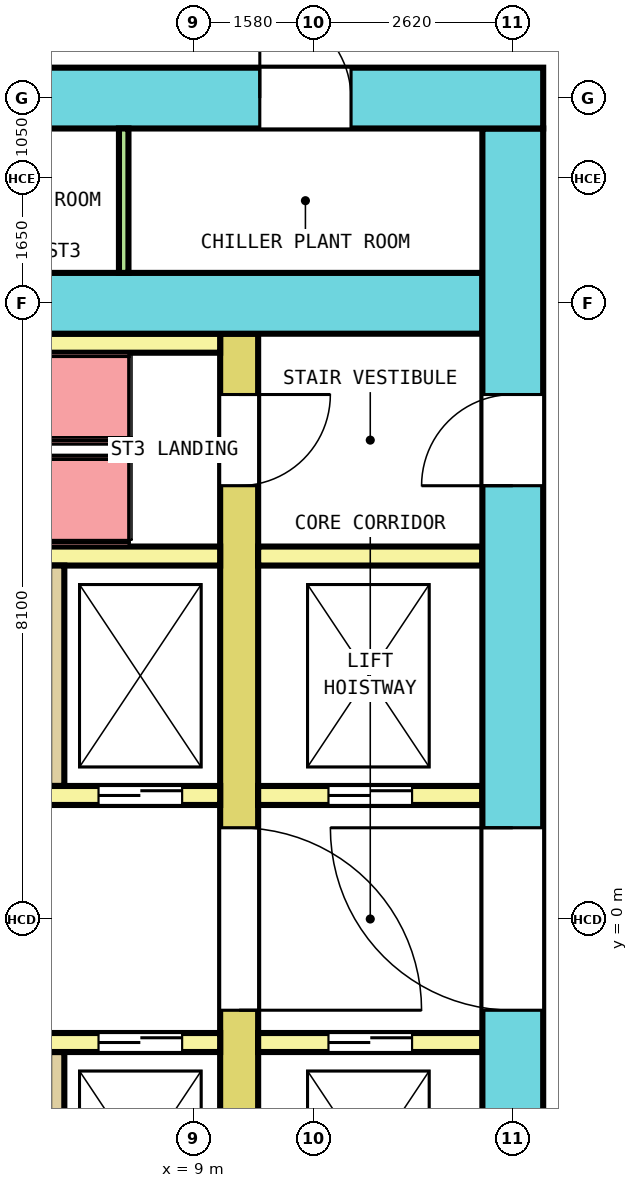
"""IFC4 building model, lengths in metres.
Left out: names, types, materials, properties, quantities, classifications, styles, units other than length and angle.
Written with IfcOpenShell. Run it as: python <this file> out.ifc"""

import sys

from ifc_helpers import new_model, si_unit, direction, frame, frame_2d, origin, place, context, subcontext, project, spatial, rectangle, extrude, element, fill, save


model = new_model("IFC4")
c1 = context("Model", 3, precision=1e-05, world=origin(), true_north=direction((0.0, 1.0)))
c2 = subcontext(c1, "Body", "Model", "MODEL_VIEW")
j1 = project(units=[si_unit("LENGTHUNIT", "METRE"), si_unit("PLANEANGLEUNIT", "RADIAN")], contexts=[c1])
p1 = place(None, origin())
s1 = spatial("IfcSite", under=j1, at=p1, CompositionType="ELEMENT")
p2 = place(p1, origin())
s2 = spatial("IfcBuilding", under=s1, at=p2, CompositionType="ELEMENT")
p3 = place(p2, frame((0.0, 0.0, 71.8)))
s3 = spatial("IfcBuildingStorey", under=s2, at=p3, CompositionType="ELEMENT", Elevation=71.8)
p4 = place(p3, frame((-13.6, 10.8, 0.0), z_axis=(0.0, 0.0, 1.0), x_axis=(1.0, 0.0, 0.0)))
e1 = element("IfcWall", 1, at=p4, inside=s3, PredefinedType="SHEAR", context=c2, shape_type="SweptSolid", body=[
    extrude(rectangle(XDim=27.2, YDim=0.8, at=frame_2d((13.6, 0.0))), origin(), (0.0, 0.0, 1.0), 8.7),
])
p5 = place(p4, frame((3.228, 0.0, 0.0)))
e2 = element("IfcOpeningElement", 2, at=p5, cuts=e1, PredefinedType="OPENING", context=c2, shape_type="SweptSolid", body=[
    extrude(rectangle(XDim=1.2, YDim=2.1, at=frame_2d((0.6, 1.05))), frame((0.0, 0.41, 0.0), z_axis=(0.0, -1.0, 0.0), x_axis=(1.0, 0.0, 0.0)), (0.0, 0.0, 1.0), 0.82),
])
p6 = place(p4, frame((9.378, 0.0, 0.0)))
e3 = element("IfcOpeningElement", 3, at=p6, cuts=e1, PredefinedType="OPENING", context=c2, shape_type="SweptSolid", body=[
    extrude(rectangle(XDim=1.2, YDim=2.1, at=frame_2d((0.6, 1.05))), frame((0.0, 0.41, 0.0), z_axis=(0.0, -1.0, 0.0), x_axis=(1.0, 0.0, 0.0)), (0.0, 0.0, 1.0), 0.82),
])
p7 = place(p4, frame((18.722, 0.0, 0.0)))
e4 = element("IfcOpeningElement", 4, at=p7, cuts=e1, PredefinedType="OPENING", context=c2, shape_type="SweptSolid", body=[
    extrude(rectangle(XDim=1.2, YDim=2.1, at=frame_2d((0.6, 1.05))), frame((0.0, 0.41, 0.0), z_axis=(0.0, -1.0, 0.0), x_axis=(1.0, 0.0, 0.0)), (0.0, 0.0, 1.0), 0.82),
])
p8 = place(p4, frame((23.472, 0.0, 0.0)))
e5 = element("IfcOpeningElement", 5, at=p8, cuts=e1, PredefinedType="OPENING", context=c2, shape_type="SweptSolid", body=[
    extrude(rectangle(XDim=1.2, YDim=2.1, at=frame_2d((0.6, 1.05))), frame((0.0, 0.41, 0.0), z_axis=(0.0, -1.0, 0.0), x_axis=(1.0, 0.0, 0.0)), (0.0, 0.0, 1.0), 0.82),
])
p9 = place(p4, frame((14.525, 0.0, 0.0)))
e6 = element("IfcOpeningElement", 6, at=p9, cuts=e1, PredefinedType="OPENING", context=c2, shape_type="SweptSolid", body=[
    extrude(rectangle(XDim=1.4, YDim=2.1, at=frame_2d((0.7, 1.05))), frame((0.0, 0.41, 0.0), z_axis=(0.0, -1.0, 0.0), x_axis=(1.0, 0.0, 0.0)), (0.0, 0.0, 1.0), 0.82),
])
p10 = place(p3, frame((13.2, -10.4, 0.0), z_axis=(0.0, 0.0, 1.0), x_axis=(0.0, 1.0, 0.0)))
e7 = element("IfcWall", 7, at=p10, inside=s3, PredefinedType="SHEAR", context=c2, shape_type="SweptSolid", body=[
    extrude(rectangle(XDim=20.8, YDim=0.8, at=frame_2d((10.4, 0.0))), origin(), (0.0, 0.0, 1.0), 8.7),
])
p11 = place(p10, frame((9.2, 0.0, 0.0)))
e8 = element("IfcOpeningElement", 8, at=p11, cuts=e7, PredefinedType="OPENING", context=c2, shape_type="SweptSolid", body=[
    extrude(rectangle(XDim=2.4, YDim=2.1, at=frame_2d((1.2, 1.05))), frame((0.0, 0.41, 0.0), z_axis=(0.0, -1.0, 0.0), x_axis=(1.0, 0.0, 0.0)), (0.0, 0.0, 1.0), 0.82),
])
p12 = place(p10, frame((16.1, 0.0, 0.0)))
e9 = element("IfcOpeningElement", 9, at=p12, cuts=e7, PredefinedType="OPENING", context=c2, shape_type="SweptSolid", body=[
    extrude(rectangle(XDim=1.2, YDim=2.1, at=frame_2d((0.6, 1.05))), frame((0.0, 0.41, 0.0), z_axis=(0.0, -1.0, 0.0), x_axis=(1.0, 0.0, 0.0)), (0.0, 0.0, 1.0), 0.82),
])
p13 = place(p10, frame((3.6, 0.0, 0.0)))
e10 = element("IfcOpeningElement", 10, at=p13, cuts=e7, PredefinedType="OPENING", context=c2, shape_type="SweptSolid", body=[
    extrude(rectangle(XDim=1.0, YDim=2.1, at=frame_2d((0.5, 1.05))), frame((0.0, 0.41, 0.0), z_axis=(0.0, -1.0, 0.0), x_axis=(1.0, 0.0, 0.0)), (0.0, 0.0, 1.0), 0.82),
])
p14 = place(p3, frame((-12.8, 8.1, 0.0), z_axis=(0.0, 0.0, 1.0), x_axis=(1.0, 0.0, 0.0)))
e11 = element("IfcWall", 11, at=p14, inside=s3, PredefinedType="SHEAR", context=c2, shape_type="SweptSolid", body=[
    extrude(rectangle(XDim=25.6, YDim=0.8, at=frame_2d((12.8, 0.0))), origin(), (0.0, 0.0, 1.0), 8.7),
])
p15 = place(p14, frame((13.725, 0.0, 0.0)))
e12 = element("IfcOpeningElement", 12, at=p15, cuts=e11, PredefinedType="OPENING", context=c2, shape_type="SweptSolid", body=[
    extrude(rectangle(XDim=1.4, YDim=2.1, at=frame_2d((0.7, 1.05))), frame((0.0, 0.41, 0.0), z_axis=(0.0, -1.0, 0.0), x_axis=(1.0, 0.0, 0.0)), (0.0, 0.0, 1.0), 0.82),
])
p16 = place(p3, frame((9.6, -7.7, 0.0), z_axis=(0.0, 0.0, 1.0), x_axis=(0.0, 1.0, 0.0)))
e13 = element("IfcWall", 13, at=p16, inside=s3, PredefinedType="SHEAR", context=c2, shape_type="SweptSolid", body=[
    extrude(rectangle(XDim=15.4, YDim=0.5, at=frame_2d((7.7, 0.0))), origin(), (0.0, 0.0, 1.0), 8.7),
])
p17 = place(p16, frame((6.5, 0.0, 0.0)))
e14 = element("IfcOpeningElement", 14, at=p17, cuts=e13, PredefinedType="OPENING", context=c2, shape_type="SweptSolid", body=[
    extrude(rectangle(XDim=2.4, YDim=2.1, at=frame_2d((1.2, 1.05))), frame((0.0, 0.26, 0.0), z_axis=(0.0, -1.0, 0.0), x_axis=(1.0, 0.0, 0.0)), (0.0, 0.0, 1.0), 0.52),
])
p18 = place(p16, frame((13.4, 0.0, 0.0)))
e15 = element("IfcOpeningElement", 15, at=p18, cuts=e13, PredefinedType="OPENING", context=c2, shape_type="SweptSolid", body=[
    extrude(rectangle(XDim=1.2, YDim=2.1, at=frame_2d((0.6, 1.05))), frame((0.0, 0.26, 0.0), z_axis=(0.0, -1.0, 0.0), x_axis=(1.0, 0.0, 0.0)), (0.0, 0.0, 1.0), 0.52),
])
p19 = place(p16, frame((0.9, 0.0, 0.0)))
e16 = element("IfcOpeningElement", 16, at=p19, cuts=e13, PredefinedType="OPENING", context=c2, shape_type="SweptSolid", body=[
    extrude(rectangle(XDim=1.0, YDim=2.1, at=frame_2d((0.5, 1.05))), frame((0.0, 0.26, 0.0), z_axis=(0.0, -1.0, 0.0), x_axis=(1.0, 0.0, 0.0)), (0.0, 0.0, 1.0), 0.52),
])
p20 = place(p3, frame((-9.35, 1.625, 0.0), z_axis=(0.0, 0.0, 1.0), x_axis=(1.0, 0.0, 0.0)))
e17 = element("IfcWall", 17, at=p20, inside=s3, PredefinedType="SOLIDWALL", context=c2, shape_type="SweptSolid", body=[
    extrude(rectangle(XDim=18.7, YDim=0.25, at=frame_2d((9.35, 0.0))), origin(), (0.0, 0.0, 1.0), 8.7),
])
p21 = place(p20, frame((0.5, 0.0, 0.0)))
e18 = element("IfcOpeningElement", 18, at=p21, cuts=e17, PredefinedType="OPENING", context=c2, shape_type="SweptSolid", body=[
    extrude(rectangle(XDim=1.1, YDim=2.1, at=frame_2d((0.55, 1.05))), frame((0.0, 0.135, 0.0), z_axis=(0.0, -1.0, 0.0), x_axis=(1.0, 0.0, 0.0)), (0.0, 0.0, 1.0), 0.27),
])
p22 = place(p20, frame((17.1, 0.0, 0.0)))
e19 = element("IfcOpeningElement", 19, at=p22, cuts=e17, PredefinedType="OPENING", context=c2, shape_type="SweptSolid", body=[
    extrude(rectangle(XDim=1.1, YDim=2.1, at=frame_2d((0.55, 1.05))), frame((0.0, 0.135, 0.0), z_axis=(0.0, -1.0, 0.0), x_axis=(1.0, 0.0, 0.0)), (0.0, 0.0, 1.0), 0.27),
])
p23 = place(p3, frame((9.85, 1.625, 0.0), z_axis=(0.0, 0.0, 1.0), x_axis=(1.0, 0.0, 0.0)))
e20 = element("IfcWall", 20, at=p23, inside=s3, PredefinedType="SOLIDWALL", context=c2, shape_type="SweptSolid", body=[
    extrude(rectangle(XDim=2.95, YDim=0.25, at=frame_2d((1.475, 0.0))), origin(), (0.0, 0.0, 1.0), 8.7),
])
p24 = place(p23, frame((0.925, 0.0, 0.0)))
e21 = element("IfcOpeningElement", 21, at=p24, cuts=e20, PredefinedType="OPENING", context=c2, shape_type="SweptSolid", body=[
    extrude(rectangle(XDim=1.1, YDim=2.1, at=frame_2d((0.55, 1.05))), frame((0.0, 0.135, 0.0), z_axis=(0.0, -1.0, 0.0), x_axis=(1.0, 0.0, 0.0)), (0.0, 0.0, 1.0), 0.27),
])
p25 = place(p3, frame((-9.35, 4.775, 0.0), z_axis=(0.0, 0.0, 1.0), x_axis=(1.0, 0.0, 0.0)))
e22 = element("IfcWall", 22, at=p25, inside=s3, PredefinedType="SOLIDWALL", context=c2, shape_type="SweptSolid", body=[
    extrude(rectangle(XDim=18.7, YDim=0.25, at=frame_2d((9.35, 0.0))), origin(), (0.0, 0.0, 1.0), 8.7),
])
p26 = place(p3, frame((9.85, 4.775, 0.0), z_axis=(0.0, 0.0, 1.0), x_axis=(1.0, 0.0, 0.0)))
e23 = element("IfcWall", 23, at=p26, inside=s3, PredefinedType="SOLIDWALL", context=c2, shape_type="SweptSolid", body=[
    extrude(rectangle(XDim=2.95, YDim=0.25, at=frame_2d((1.475, 0.0))), origin(), (0.0, 0.0, 1.0), 8.7),
])
p27 = place(p3, frame((7.2, 1.75, 0.0), z_axis=(0.0, 0.0, 1.0), x_axis=(0.0, 1.0, 0.0)))
e24 = element("IfcWall", 24, at=p27, inside=s3, PredefinedType="SOLIDWALL", context=c2, shape_type="SweptSolid", body=[
    extrude(rectangle(XDim=2.9, YDim=0.2, at=frame_2d((1.45, 0.0))), origin(), (0.0, 0.0, 1.0), 8.7),
])
p28 = place(p3, frame((-9.35, -1.625, 0.0), z_axis=(0.0, 0.0, 1.0), x_axis=(1.0, 0.0, 0.0)))
e25 = element("IfcWall", 25, at=p28, inside=s3, PredefinedType="SOLIDWALL", context=c2, shape_type="SweptSolid", body=[
    extrude(rectangle(XDim=18.7, YDim=0.25, at=frame_2d((9.35, 0.0))), origin(), (0.0, 0.0, 1.0), 8.7),
])
p29 = place(p28, frame((0.5, 0.0, 0.0)))
e26 = element("IfcOpeningElement", 26, at=p29, cuts=e25, PredefinedType="OPENING", context=c2, shape_type="SweptSolid", body=[
    extrude(rectangle(XDim=1.1, YDim=2.1, at=frame_2d((0.55, 1.05))), frame((0.0, 0.135, 0.0), z_axis=(0.0, -1.0, 0.0), x_axis=(1.0, 0.0, 0.0)), (0.0, 0.0, 1.0), 0.27),
])
p30 = place(p28, frame((17.1, 0.0, 0.0)))
e27 = element("IfcOpeningElement", 27, at=p30, cuts=e25, PredefinedType="OPENING", context=c2, shape_type="SweptSolid", body=[
    extrude(rectangle(XDim=1.1, YDim=2.1, at=frame_2d((0.55, 1.05))), frame((0.0, 0.135, 0.0), z_axis=(0.0, -1.0, 0.0), x_axis=(1.0, 0.0, 0.0)), (0.0, 0.0, 1.0), 0.27),
])
p31 = place(p3, frame((9.85, -1.625, 0.0), z_axis=(0.0, 0.0, 1.0), x_axis=(1.0, 0.0, 0.0)))
e28 = element("IfcWall", 28, at=p31, inside=s3, PredefinedType="SOLIDWALL", context=c2, shape_type="SweptSolid", body=[
    extrude(rectangle(XDim=2.95, YDim=0.25, at=frame_2d((1.475, 0.0))), origin(), (0.0, 0.0, 1.0), 8.7),
])
p32 = place(p31, frame((0.925, 0.0, 0.0)))
e29 = element("IfcOpeningElement", 29, at=p32, cuts=e28, PredefinedType="OPENING", context=c2, shape_type="SweptSolid", body=[
    extrude(rectangle(XDim=1.1, YDim=2.1, at=frame_2d((0.55, 1.05))), frame((0.0, 0.135, 0.0), z_axis=(0.0, -1.0, 0.0), x_axis=(1.0, 0.0, 0.0)), (0.0, 0.0, 1.0), 0.27),
])
p33 = place(p3, frame((7.2, -4.65, 0.0), z_axis=(0.0, 0.0, 1.0), x_axis=(0.0, 1.0, 0.0)))
e30 = element("IfcWall", 30, at=p33, inside=s3, PredefinedType="SOLIDWALL", context=c2, shape_type="SweptSolid", body=[
    extrude(rectangle(XDim=2.9, YDim=0.2, at=frame_2d((1.45, 0.0))), origin(), (0.0, 0.0, 1.0), 8.7),
])
p34 = place(p3, frame((3.55, 7.575, 0.0), z_axis=(0.0, 0.0, 1.0), x_axis=(1.0, 0.0, 0.0)))
e31 = element("IfcWall", 31, at=p34, inside=s3, PredefinedType="SOLIDWALL", context=c2, shape_type="SweptSolid", body=[
    extrude(rectangle(XDim=5.8, YDim=0.25, at=frame_2d((2.9, 0.0))), origin(), (0.0, 0.0, 1.0), 8.7),
])
p35 = place(p3, frame((8.081, 8.5, 0.0), z_axis=(0.0, 0.0, 1.0), x_axis=(0.0, 1.0, 0.0)))
e32 = element("IfcWall", 32, at=p35, inside=s3, PredefinedType="PARTITIONING", context=c2, shape_type="SweptSolid", body=[
    extrude(rectangle(XDim=1.9, YDim=0.125, at=frame_2d((0.95, 0.0))), origin(), (0.0, 0.0, 1.0), 8.7),
])
p36 = place(p22, origin())
e33 = element("IfcDoor", 33, at=p36, inside=s3, OperationType="DOUBLE_DOOR_SLIDING", PredefinedType="DOOR", context=c2, shape_type="SweptSolid", body=[
    extrude(rectangle(XDim=1.1, YDim=2.1, at=frame_2d((0.55, 1.05))), frame((0.0, 0.075, 0.0), z_axis=(0.0, -1.0, 0.0), x_axis=(1.0, 0.0, 0.0)), (0.0, 0.0, 1.0), 0.15),
])
fill(e19, e33)
p37 = place(p24, origin())
e34 = element("IfcDoor", 34, at=p37, inside=s3, OperationType="DOUBLE_DOOR_SLIDING", PredefinedType="DOOR", context=c2, shape_type="SweptSolid", body=[
    extrude(rectangle(XDim=1.1, YDim=2.1, at=frame_2d((0.55, 1.05))), frame((0.0, 0.075, 0.0), z_axis=(0.0, -1.0, 0.0), x_axis=(1.0, 0.0, 0.0)), (0.0, 0.0, 1.0), 0.15),
])
fill(e21, e34)
p38 = place(p30, origin())
e35 = element("IfcDoor", 35, at=p38, inside=s3, OperationType="DOUBLE_DOOR_SLIDING", PredefinedType="DOOR", context=c2, shape_type="SweptSolid", body=[
    extrude(rectangle(XDim=1.1, YDim=2.1, at=frame_2d((0.55, 1.05))), frame((0.0, 0.075, 0.0), z_axis=(0.0, -1.0, 0.0), x_axis=(1.0, 0.0, 0.0)), (0.0, 0.0, 1.0), 0.15),
])
fill(e27, e35)
p39 = place(p32, origin())
e36 = element("IfcDoor", 36, at=p39, inside=s3, OperationType="DOUBLE_DOOR_SLIDING", PredefinedType="DOOR", context=c2, shape_type="SweptSolid", body=[
    extrude(rectangle(XDim=1.1, YDim=2.1, at=frame_2d((0.55, 1.05))), frame((0.0, 0.075, 0.0), z_axis=(0.0, -1.0, 0.0), x_axis=(1.0, 0.0, 0.0)), (0.0, 0.0, 1.0), 0.15),
])
fill(e29, e36)
p40 = place(p17, origin())
e37 = element("IfcDoor", 37, at=p40, inside=s3, OperationType="DOUBLE_DOOR_SINGLE_SWING", PredefinedType="DOOR", context=c2, shape_type="SweptSolid", body=[
    extrude(rectangle(XDim=2.4, YDim=2.1, at=frame_2d((1.2, 1.05))), frame((0.0, 0.2, 0.0), z_axis=(0.0, -1.0, 0.0), x_axis=(1.0, 0.0, 0.0)), (0.0, 0.0, 1.0), 0.4),
])
fill(e14, e37)
p41 = place(p11, origin())
e38 = element("IfcDoor", 38, at=p41, inside=s3, OperationType="DOUBLE_DOOR_SINGLE_SWING", PredefinedType="DOOR", context=c2, shape_type="SweptSolid", body=[
    extrude(rectangle(XDim=2.4, YDim=2.1, at=frame_2d((1.2, 1.05))), frame((0.0, 0.3, 0.0), z_axis=(0.0, -1.0, 0.0), x_axis=(1.0, 0.0, 0.0)), (0.0, 0.0, 1.0), 0.6),
])
fill(e8, e38)
p42 = place(p18, origin())
e39 = element("IfcDoor", 39, at=p42, inside=s3, OperationType="SINGLE_SWING_RIGHT", PredefinedType="DOOR", context=c2, shape_type="SweptSolid", body=[
    extrude(rectangle(XDim=1.2, YDim=2.1, at=frame_2d((0.6, 1.05))), frame((0.0, 0.2, 0.0), z_axis=(0.0, -1.0, 0.0), x_axis=(1.0, 0.0, 0.0)), (0.0, 0.0, 1.0), 0.4),
])
fill(e15, e39)
p43 = place(p12, origin())
e40 = element("IfcDoor", 40, at=p43, inside=s3, OperationType="SINGLE_SWING_LEFT", PredefinedType="DOOR", context=c2, shape_type="SweptSolid", body=[
    extrude(rectangle(XDim=1.2, YDim=2.1, at=frame_2d((0.6, 1.05))), frame((0.0, 0.3, 0.0), z_axis=(0.0, -1.0, 0.0), x_axis=(1.0, 0.0, 0.0)), (0.0, 0.0, 1.0), 0.6),
])
fill(e9, e40)
p44 = place(p8, origin())
e41 = element("IfcDoor", 41, at=p44, inside=s3, OperationType="SINGLE_SWING_LEFT", PredefinedType="DOOR", context=c2, shape_type="SweptSolid", body=[
    extrude(rectangle(XDim=1.2, YDim=2.1, at=frame_2d((0.6, 1.05))), frame((0.0, 0.3, 0.0), z_axis=(0.0, -1.0, 0.0), x_axis=(1.0, 0.0, 0.0)), (0.0, 0.0, 1.0), 0.6),
])
fill(e5, e41)
save(model, sys.argv[1])
